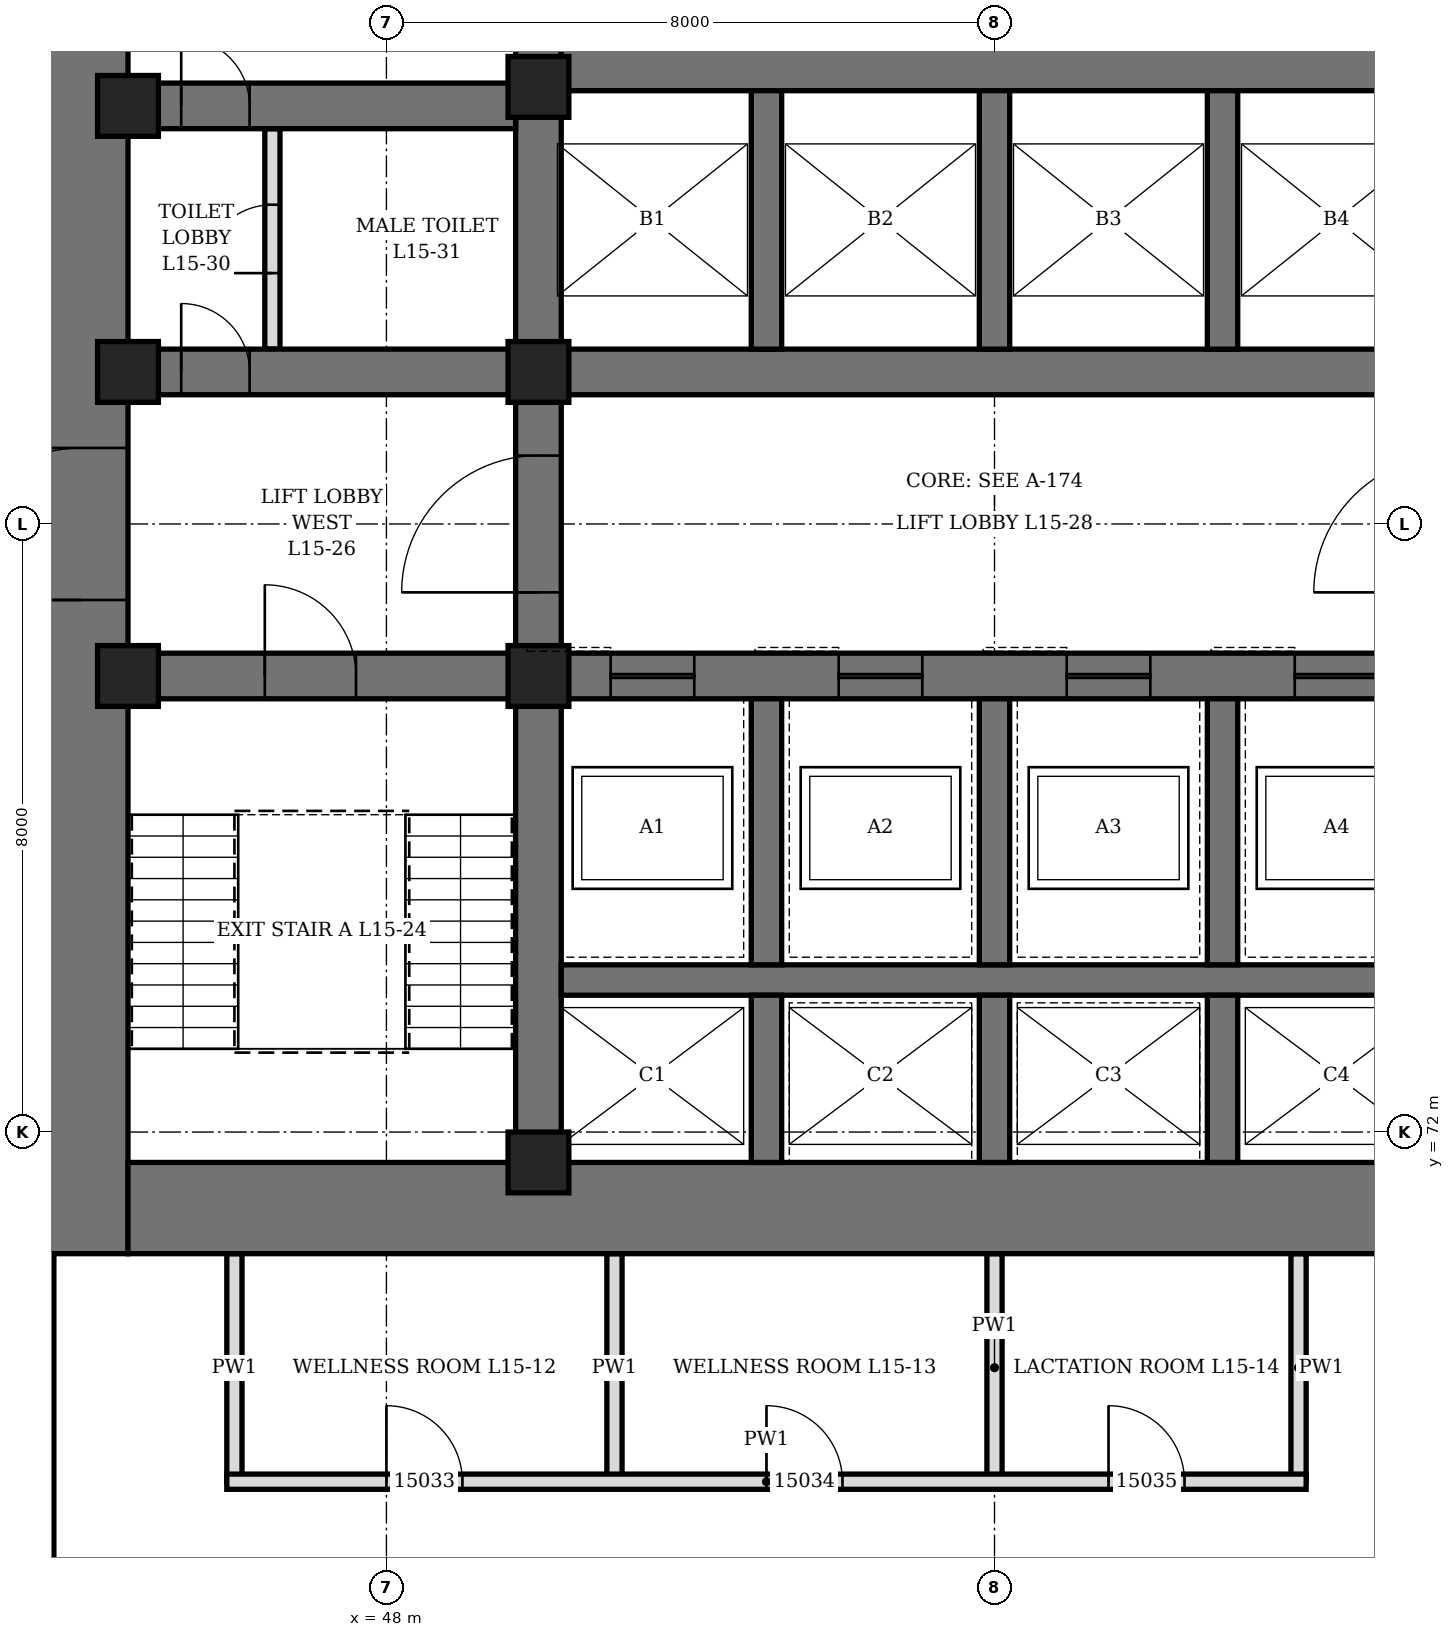
"""IFC4 building model, lengths in metres.
Left out: names, types, materials, properties, quantities, classifications, styles, units other than length and angle.
Written with IfcOpenShell. Run it as: python <this file> out.ifc"""

import sys

from ifc_helpers import new_model, si_unit, direction, frame, frame_2d, origin, origin_2d, place, context, subcontext, project, spatial, rectangle, hollow_rectangle, extrude, element, fill, save


model = new_model("IFC4")
c1 = context("Model", 3, precision=1e-05, world=origin(), true_north=direction((0.0, 1.0)))
c2 = subcontext(c1, "Body", "Model", "MODEL_VIEW")
j1 = project(units=[si_unit("LENGTHUNIT", "METRE"), si_unit("PLANEANGLEUNIT", "RADIAN")], contexts=[c1])
p1 = place(None, origin())
s1 = spatial("IfcSite", under=j1, at=p1, CompositionType="ELEMENT")
p2 = place(p1, origin())
s2 = spatial("IfcBuilding", under=s1, at=p2, CompositionType="ELEMENT")
p3 = place(p2, frame((0.0, 0.0, 72.7)))
s3 = spatial("IfcBuildingStorey", under=s2, at=p3, CompositionType="ELEMENT", Elevation=72.7)
p4 = place(p3, frame((44.0, 70.4, 0.0), z_axis=(0.0, 0.0, 1.0), x_axis=(0.0, 1.0, 0.0)))
e1 = element("IfcWall", 1, at=p4, inside=s3, PredefinedType="SHEAR", context=c2, shape_type="SweptSolid", body=[
    extrude(rectangle(XDim=19.2, YDim=1.2, at=frame_2d((9.6, 0.0))), origin(), (0.0, 0.0, 1.0), 4.2),
])
p5 = place(p4, frame((8.6, 0.0, 0.0)))
e2 = element("IfcOpeningElement", 2, at=p5, cuts=e1, PredefinedType="OPENING", context=c2, shape_type="SweptSolid", body=[
    extrude(rectangle(XDim=2.0, YDim=2.4, at=frame_2d((1.0, 1.2))), frame((0.0, 0.61, 0.0), z_axis=(0.0, -1.0, 0.0), x_axis=(1.0, 0.0, 0.0)), (0.0, 0.0, 1.0), 1.22),
])
p6 = place(p3, frame((44.6, 71.0, 0.0), z_axis=(0.0, 0.0, 1.0), x_axis=(1.0, 0.0, 0.0)))
e3 = element("IfcWall", 3, at=p6, inside=s3, PredefinedType="SHEAR", context=c2, shape_type="SweptSolid", body=[
    extrude(rectangle(XDim=22.8, YDim=1.2, at=frame_2d((11.4, 0.0))), origin(), (0.0, 0.0, 1.0), 4.2),
])
p7 = place(p3, frame((50.0, 71.6, 0.0), z_axis=(0.0, 0.0, 1.0), x_axis=(0.0, 1.0, 0.0)))
e4 = element("IfcWall", 4, at=p7, inside=s3, PredefinedType="SHEAR", context=c2, shape_type="SweptSolid", body=[
    extrude(rectangle(XDim=16.8, YDim=0.6, at=frame_2d((8.4, 0.0))), origin(), (0.0, 0.0, 1.0), 4.2),
])
p8 = place(p7, frame((7.5, 0.0, 0.0)))
e5 = element("IfcOpeningElement", 5, at=p8, cuts=e4, PredefinedType="OPENING", context=c2, shape_type="SweptSolid", body=[
    extrude(rectangle(XDim=1.8, YDim=2.4, at=frame_2d((0.9, 1.2))), frame((0.0, 0.31, 0.0), z_axis=(0.0, -1.0, 0.0), x_axis=(1.0, 0.0, 0.0)), (0.0, 0.0, 1.0), 0.62),
])
p9 = place(p3, frame((44.6, 78.0, 0.0), z_axis=(0.0, 0.0, 1.0), x_axis=(1.0, 0.0, 0.0)))
e6 = element("IfcWall", 6, at=p9, inside=s3, PredefinedType="SHEAR", context=c2, shape_type="SweptSolid", body=[
    extrude(rectangle(XDim=5.1, YDim=0.6, at=frame_2d((2.55, 0.0))), origin(), (0.0, 0.0, 1.0), 4.2),
])
p10 = place(p9, frame((1.8, 0.0, 0.0)))
e7 = element("IfcOpeningElement", 7, at=p10, cuts=e6, PredefinedType="OPENING", context=c2, shape_type="SweptSolid", body=[
    extrude(rectangle(XDim=1.2, YDim=2.1, at=frame_2d((0.6, 1.05))), frame((0.0, 0.31, 0.0), z_axis=(0.0, -1.0, 0.0), x_axis=(1.0, 0.0, 0.0)), (0.0, 0.0, 1.0), 0.62),
])
p11 = place(p3, frame((44.6, 82.0, 0.0), z_axis=(0.0, 0.0, 1.0), x_axis=(1.0, 0.0, 0.0)))
e8 = element("IfcWall", 8, at=p11, inside=s3, PredefinedType="SHEAR", context=c2, shape_type="SweptSolid", body=[
    extrude(rectangle(XDim=5.1, YDim=0.6, at=frame_2d((2.55, 0.0))), origin(), (0.0, 0.0, 1.0), 4.2),
])
p12 = place(p11, frame((0.7, 0.0, 0.0)))
e9 = element("IfcOpeningElement", 9, at=p12, cuts=e8, PredefinedType="OPENING", context=c2, shape_type="SweptSolid", body=[
    extrude(rectangle(XDim=0.9, YDim=2.1, at=frame_2d((0.45, 1.05))), frame((0.0, 0.31, 0.0), z_axis=(0.0, -1.0, 0.0), x_axis=(1.0, 0.0, 0.0)), (0.0, 0.0, 1.0), 0.62),
])
p13 = place(p3, frame((44.6, 85.5, 0.0), z_axis=(0.0, 0.0, 1.0), x_axis=(1.0, 0.0, 0.0)))
e10 = element("IfcWall", 10, at=p13, inside=s3, PredefinedType="SHEAR", context=c2, shape_type="SweptSolid", body=[
    extrude(rectangle(XDim=5.1, YDim=0.6, at=frame_2d((2.55, 0.0))), origin(), (0.0, 0.0, 1.0), 4.2),
])
p14 = place(p13, frame((0.7, 0.0, 0.0)))
e11 = element("IfcOpeningElement", 11, at=p14, cuts=e10, PredefinedType="OPENING", context=c2, shape_type="SweptSolid", body=[
    extrude(rectangle(XDim=0.9, YDim=2.1, at=frame_2d((0.45, 1.05))), frame((0.0, 0.31, 0.0), z_axis=(0.0, -1.0, 0.0), x_axis=(1.0, 0.0, 0.0)), (0.0, 0.0, 1.0), 0.62),
])
p15 = place(p3, frame((50.3, 78.0, 0.0), z_axis=(0.0, 0.0, 1.0), x_axis=(1.0, 0.0, 0.0)))
e12 = element("IfcWall", 12, at=p15, inside=s3, PredefinedType="SHEAR", context=c2, shape_type="SweptSolid", body=[
    extrude(rectangle(XDim=11.4, YDim=0.6, at=frame_2d((5.7, 0.0))), origin(), (0.0, 0.0, 1.0), 4.2),
])
p16 = place(p15, frame((0.65, 0.0, 0.0)))
e13 = element("IfcOpeningElement", 13, at=p16, cuts=e12, PredefinedType="OPENING", context=c2, shape_type="SweptSolid", body=[
    extrude(rectangle(XDim=1.1, YDim=2.2, at=frame_2d((0.55, 1.1))), frame((0.0, 0.31, 0.0), z_axis=(0.0, -1.0, 0.0), x_axis=(1.0, 0.0, 0.0)), (0.0, 0.0, 1.0), 0.62),
])
p17 = place(p15, frame((3.65, 0.0, 0.0)))
e14 = element("IfcOpeningElement", 14, at=p17, cuts=e12, PredefinedType="OPENING", context=c2, shape_type="SweptSolid", body=[
    extrude(rectangle(XDim=1.1, YDim=2.2, at=frame_2d((0.55, 1.1))), frame((0.0, 0.31, 0.0), z_axis=(0.0, -1.0, 0.0), x_axis=(1.0, 0.0, 0.0)), (0.0, 0.0, 1.0), 0.62),
])
p18 = place(p15, frame((6.65, 0.0, 0.0)))
e15 = element("IfcOpeningElement", 15, at=p18, cuts=e12, PredefinedType="OPENING", context=c2, shape_type="SweptSolid", body=[
    extrude(rectangle(XDim=1.1, YDim=2.2, at=frame_2d((0.55, 1.1))), frame((0.0, 0.31, 0.0), z_axis=(0.0, -1.0, 0.0), x_axis=(1.0, 0.0, 0.0)), (0.0, 0.0, 1.0), 0.62),
])
p19 = place(p15, frame((9.65, 0.0, 0.0)))
e16 = element("IfcOpeningElement", 16, at=p19, cuts=e12, PredefinedType="OPENING", context=c2, shape_type="SweptSolid", body=[
    extrude(rectangle(XDim=1.1, YDim=2.2, at=frame_2d((0.55, 1.1))), frame((0.0, 0.31, 0.0), z_axis=(0.0, -1.0, 0.0), x_axis=(1.0, 0.0, 0.0)), (0.0, 0.0, 1.0), 0.62),
])
for number, where, z_axis, x_axis in (
    (17, (50.3, 82.0, 0.0), (0.0, 0.0, 1.0), (1.0, 0.0, 0.0)),
    (18, (50.3, 86.0, 0.0), (0.0, 0.0, 1.0), (1.0, 0.0, 0.0)),
):
    element("IfcWall", number, at=place(p3, frame(where, z_axis=z_axis, x_axis=x_axis)), inside=s3, PredefinedType="SHEAR", context=c2, shape_type="SweptSolid", body=[
        extrude(rectangle(XDim=11.4, YDim=0.6, at=frame_2d((5.7, 0.0))), origin(), (0.0, 0.0, 1.0), 4.2),
    ])
p20 = place(p3, frame((50.3, 74.0, 0.0), z_axis=(0.0, 0.0, 1.0), x_axis=(1.0, 0.0, 0.0)))
e19 = element("IfcWall", 19, at=p20, inside=s3, PredefinedType="SHEAR", context=c2, shape_type="SweptSolid", body=[
    extrude(rectangle(XDim=11.4, YDim=0.4, at=frame_2d((5.7, 0.0))), origin(), (0.0, 0.0, 1.0), 4.2),
])
p21 = place(p3, frame((53.0, 71.6, 0.0), z_axis=(0.0, 0.0, 1.0), x_axis=(0.0, 1.0, 0.0)))
e20 = element("IfcWall", 20, at=p21, inside=s3, PredefinedType="SHEAR", context=c2, shape_type="SweptSolid", body=[
    extrude(rectangle(XDim=2.2, YDim=0.4, at=frame_2d((1.1, 0.0))), origin(), (0.0, 0.0, 1.0), 4.2),
])
p22 = place(p3, frame((53.0, 74.2, 0.0), z_axis=(0.0, 0.0, 1.0), x_axis=(0.0, 1.0, 0.0)))
e21 = element("IfcWall", 21, at=p22, inside=s3, PredefinedType="SHEAR", context=c2, shape_type="SweptSolid", body=[
    extrude(rectangle(XDim=3.5, YDim=0.4, at=frame_2d((1.75, 0.0))), origin(), (0.0, 0.0, 1.0), 4.2),
])
p23 = place(p3, frame((53.0, 82.3, 0.0), z_axis=(0.0, 0.0, 1.0), x_axis=(0.0, 1.0, 0.0)))
e22 = element("IfcWall", 22, at=p23, inside=s3, PredefinedType="SHEAR", context=c2, shape_type="SweptSolid", body=[
    extrude(rectangle(XDim=3.4, YDim=0.4, at=frame_2d((1.7, 0.0))), origin(), (0.0, 0.0, 1.0), 4.2),
])
p24 = place(p3, frame((56.0, 71.6, 0.0), z_axis=(0.0, 0.0, 1.0), x_axis=(0.0, 1.0, 0.0)))
e23 = element("IfcWall", 23, at=p24, inside=s3, PredefinedType="SHEAR", context=c2, shape_type="SweptSolid", body=[
    extrude(rectangle(XDim=2.2, YDim=0.4, at=frame_2d((1.1, 0.0))), origin(), (0.0, 0.0, 1.0), 4.2),
])
p25 = place(p3, frame((56.0, 74.2, 0.0), z_axis=(0.0, 0.0, 1.0), x_axis=(0.0, 1.0, 0.0)))
e24 = element("IfcWall", 24, at=p25, inside=s3, PredefinedType="SHEAR", context=c2, shape_type="SweptSolid", body=[
    extrude(rectangle(XDim=3.5, YDim=0.4, at=frame_2d((1.75, 0.0))), origin(), (0.0, 0.0, 1.0), 4.2),
])
p26 = place(p3, frame((56.0, 82.3, 0.0), z_axis=(0.0, 0.0, 1.0), x_axis=(0.0, 1.0, 0.0)))
e25 = element("IfcWall", 25, at=p26, inside=s3, PredefinedType="SHEAR", context=c2, shape_type="SweptSolid", body=[
    extrude(rectangle(XDim=3.4, YDim=0.4, at=frame_2d((1.7, 0.0))), origin(), (0.0, 0.0, 1.0), 4.2),
])
p27 = place(p3, frame((59.0, 71.6, 0.0), z_axis=(0.0, 0.0, 1.0), x_axis=(0.0, 1.0, 0.0)))
e26 = element("IfcWall", 26, at=p27, inside=s3, PredefinedType="SHEAR", context=c2, shape_type="SweptSolid", body=[
    extrude(rectangle(XDim=2.2, YDim=0.4, at=frame_2d((1.1, 0.0))), origin(), (0.0, 0.0, 1.0), 4.2),
])
p28 = place(p3, frame((59.0, 74.2, 0.0), z_axis=(0.0, 0.0, 1.0), x_axis=(0.0, 1.0, 0.0)))
e27 = element("IfcWall", 27, at=p28, inside=s3, PredefinedType="SHEAR", context=c2, shape_type="SweptSolid", body=[
    extrude(rectangle(XDim=3.5, YDim=0.4, at=frame_2d((1.75, 0.0))), origin(), (0.0, 0.0, 1.0), 4.2),
])
p29 = place(p3, frame((59.0, 82.3, 0.0), z_axis=(0.0, 0.0, 1.0), x_axis=(0.0, 1.0, 0.0)))
e28 = element("IfcWall", 28, at=p29, inside=s3, PredefinedType="SHEAR", context=c2, shape_type="SweptSolid", body=[
    extrude(rectangle(XDim=3.4, YDim=0.4, at=frame_2d((1.7, 0.0))), origin(), (0.0, 0.0, 1.0), 4.2),
])
for number, where, z_axis, x_axis in (
    (29, (44.6, 78.0, 0.0), (0.0, 0.0, 1.0), (1.0, 0.0, 0.0)),
    (30, (44.6, 82.0, 0.0), (0.0, 0.0, 1.0), (1.0, 0.0, 0.0)),
    (31, (44.6, 85.5, 0.0), (0.0, 0.0, 1.0), (1.0, 0.0, 0.0)),
    (32, (50.0, 71.6, 0.0), (0.0, 0.0, 1.0), (1.0, 0.0, 0.0)),
    (33, (50.0, 78.0, 0.0), (0.0, 0.0, 1.0), (1.0, 0.0, 0.0)),
    (34, (50.0, 82.0, 0.0), (0.0, 0.0, 1.0), (1.0, 0.0, 0.0)),
    (35, (50.0, 85.75, 0.0), (0.0, 0.0, 1.0), (1.0, 0.0, 0.0)),
):
    element("IfcColumn", number, at=place(p3, frame(where, z_axis=z_axis, x_axis=x_axis)), inside=s3, PredefinedType="COLUMN", context=c2, shape_type="SweptSolid", body=[
        extrude(hollow_rectangle(XDim=0.8, YDim=0.8, WallThickness=0.1, at=origin_2d()), origin(), (0.0, 0.0, 1.0), 4.2),
    ])
p30 = place(p3, frame((46.5, 82.3, 0.0), z_axis=(0.0, 0.0, 1.0), x_axis=(0.0, 1.0, 0.0)))
e36 = element("IfcWall", 36, at=p30, inside=s3, PredefinedType="PARTITIONING", context=c2, shape_type="SweptSolid", body=[
    extrude(rectangle(XDim=2.9, YDim=0.2, at=frame_2d((1.45, 0.0))), origin(), (0.0, 0.0, 1.0), 4.04),
])
p31 = place(p30, frame((1.0, 0.0, 0.0)))
e37 = element("IfcOpeningElement", 37, at=p31, cuts=e36, PredefinedType="OPENING", context=c2, shape_type="SweptSolid", body=[
    extrude(rectangle(XDim=0.9, YDim=2.1, at=frame_2d((0.45, 1.05))), frame((0.0, 0.11, 0.0), z_axis=(0.0, -1.0, 0.0), x_axis=(1.0, 0.0, 0.0)), (0.0, 0.0, 1.0), 0.22),
])
for number, where, z_axis, x_axis in (
    (38, (46.0, 67.4, 0.0), (0.0, 0.0, 1.0), (0.0, 1.0, 0.0)),
    (39, (51.0, 67.4, 0.0), (0.0, 0.0, 1.0), (0.0, 1.0, 0.0)),
    (40, (56.0, 67.4, 0.0), (0.0, 0.0, 1.0), (0.0, 1.0, 0.0)),
    (41, (60.0, 67.4, 0.0), (0.0, 0.0, 1.0), (0.0, 1.0, 0.0)),
):
    element("IfcWall", number, at=place(p3, frame(where, z_axis=z_axis, x_axis=x_axis)), inside=s3, PredefinedType="PARTITIONING", context=c2, shape_type="SweptSolid", body=[
        extrude(rectangle(XDim=3.0, YDim=0.2, at=frame_2d((1.5, 0.0))), origin(), (0.0, 0.0, 1.0), 4.04),
    ])
p32 = place(p3, frame((45.9, 67.4, 0.0), z_axis=(0.0, 0.0, 1.0), x_axis=(1.0, 0.0, 0.0)))
e42 = element("IfcWall", 42, at=p32, inside=s3, PredefinedType="PARTITIONING", context=c2, shape_type="SweptSolid", body=[
    extrude(rectangle(XDim=14.2, YDim=0.2, at=frame_2d((7.1, 0.0))), origin(), (0.0, 0.0, 1.0), 4.04),
])
p33 = place(p32, frame((2.1, 0.0, 0.0)))
e43 = element("IfcOpeningElement", 43, at=p33, cuts=e42, PredefinedType="OPENING", context=c2, shape_type="SweptSolid", body=[
    extrude(rectangle(XDim=1.0, YDim=2.1, at=frame_2d((0.5, 1.05))), frame((0.0, 0.11, 0.0), z_axis=(0.0, -1.0, 0.0), x_axis=(1.0, 0.0, 0.0)), (0.0, 0.0, 1.0), 0.22),
])
p34 = place(p32, frame((7.1, 0.0, 0.0)))
e44 = element("IfcOpeningElement", 44, at=p34, cuts=e42, PredefinedType="OPENING", context=c2, shape_type="SweptSolid", body=[
    extrude(rectangle(XDim=1.0, YDim=2.1, at=frame_2d((0.5, 1.05))), frame((0.0, 0.11, 0.0), z_axis=(0.0, -1.0, 0.0), x_axis=(1.0, 0.0, 0.0)), (0.0, 0.0, 1.0), 0.22),
])
p35 = place(p32, frame((11.6, 0.0, 0.0)))
e45 = element("IfcOpeningElement", 45, at=p35, cuts=e42, PredefinedType="OPENING", context=c2, shape_type="SweptSolid", body=[
    extrude(rectangle(XDim=1.0, YDim=2.1, at=frame_2d((0.5, 1.05))), frame((0.0, 0.11, 0.0), z_axis=(0.0, -1.0, 0.0), x_axis=(1.0, 0.0, 0.0)), (0.0, 0.0, 1.0), 0.22),
])
p36 = place(p3, frame((43.55, 55.31, 0.0), z_axis=(0.0, 0.0, 1.0), x_axis=(0.0, 1.0, 0.0)))
e46 = element("IfcWall", 46, at=p36, inside=s3, PredefinedType="PARTITIONING", context=c2, shape_type="SweptSolid", body=[
    extrude(rectangle(XDim=15.09, YDim=0.15, at=frame_2d((7.545, 0.0))), origin(), (0.0, 0.0, 1.0), 4.04),
])
p37 = place(p36, frame((7.045, 0.0, 0.0)))
e47 = element("IfcOpeningElement", 47, at=p37, cuts=e46, PredefinedType="OPENING", context=c2, shape_type="SweptSolid", body=[
    extrude(rectangle(XDim=1.0, YDim=2.4, at=frame_2d((0.5, 1.2))), frame((0.0, 0.085, 0.0), z_axis=(0.0, -1.0, 0.0), x_axis=(1.0, 0.0, 0.0)), (0.0, 0.0, 1.0), 0.17),
])
p38 = place(p12, origin())
e48 = element("IfcDoor", 48, at=p38, inside=s3, OperationType="SINGLE_SWING_LEFT", PredefinedType="DOOR", context=c2, shape_type="SweptSolid", body=[
    extrude(rectangle(XDim=0.9, YDim=2.1, at=frame_2d((0.45, 1.05))), frame((0.0, 0.3, 0.0), z_axis=(0.0, -1.0, 0.0), x_axis=(1.0, 0.0, 0.0)), (0.0, 0.0, 1.0), 0.6),
])
fill(e9, e48)
p39 = place(p31, origin())
e49 = element("IfcDoor", 49, at=p39, inside=s3, OperationType="SINGLE_SWING_RIGHT", PredefinedType="DOOR", context=c2, shape_type="SweptSolid", body=[
    extrude(rectangle(XDim=0.9, YDim=2.1, at=frame_2d((0.45, 1.05))), frame((0.0, 0.1, 0.0), z_axis=(0.0, -1.0, 0.0), x_axis=(1.0, 0.0, 0.0)), (0.0, 0.0, 1.0), 0.199),
])
fill(e37, e49)
p40 = place(p14, origin())
e50 = element("IfcDoor", 50, at=p40, inside=s3, OperationType="SINGLE_SWING_RIGHT", PredefinedType="DOOR", context=c2, shape_type="SweptSolid", body=[
    extrude(rectangle(XDim=0.9, YDim=2.1, at=frame_2d((0.45, 1.05))), frame((0.0, 0.3, 0.0), z_axis=(0.0, -1.0, 0.0), x_axis=(1.0, 0.0, 0.0)), (0.0, 0.0, 1.0), 0.6),
])
fill(e11, e50)
p41 = place(p10, origin())
e51 = element("IfcDoor", 51, at=p41, inside=s3, OperationType="SINGLE_SWING_LEFT", PredefinedType="DOOR", context=c2, shape_type="SweptSolid", body=[
    extrude(rectangle(XDim=1.2, YDim=2.1, at=frame_2d((0.6, 1.05))), frame((0.0, 0.3, 0.0), z_axis=(0.0, -1.0, 0.0), x_axis=(1.0, 0.0, 0.0)), (0.0, 0.0, 1.0), 0.6),
])
fill(e7, e51)
p42 = place(p5, origin())
e52 = element("IfcDoor", 52, at=p42, inside=s3, OperationType="DOUBLE_DOOR_SINGLE_SWING", PredefinedType="DOOR", context=c2, shape_type="SweptSolid", body=[
    extrude(rectangle(XDim=2.0, YDim=2.4, at=frame_2d((1.0, 1.2))), frame((0.0, 0.35, 0.0), z_axis=(0.0, -1.0, 0.0), x_axis=(1.0, 0.0, 0.0)), (0.0, 0.0, 1.0), 0.7),
])
fill(e2, e52)
p43 = place(p8, origin())
e53 = element("IfcDoor", 53, at=p43, inside=s3, OperationType="DOUBLE_DOOR_SINGLE_SWING", PredefinedType="DOOR", context=c2, shape_type="SweptSolid", body=[
    extrude(rectangle(XDim=1.8, YDim=2.4, at=frame_2d((0.9, 1.2))), frame((0.0, 0.3, 0.0), z_axis=(0.0, -1.0, 0.0), x_axis=(1.0, 0.0, 0.0)), (0.0, 0.0, 1.0), 0.6),
])
fill(e5, e53)
p44 = place(p16, origin())
e54 = element("IfcDoor", 54, at=p44, inside=s3, OperationType="SLIDING_TO_LEFT", PredefinedType="DOOR", context=c2, shape_type="SweptSolid", body=[
    extrude(rectangle(XDim=1.1, YDim=2.2, at=frame_2d((0.55, 1.1))), frame((0.0, 0.3, 0.0), z_axis=(0.0, -1.0, 0.0), x_axis=(1.0, 0.0, 0.0)), (0.0, 0.0, 1.0), 0.6),
])
fill(e13, e54)
p45 = place(p17, origin())
e55 = element("IfcDoor", 55, at=p45, inside=s3, OperationType="SLIDING_TO_LEFT", PredefinedType="DOOR", context=c2, shape_type="SweptSolid", body=[
    extrude(rectangle(XDim=1.1, YDim=2.2, at=frame_2d((0.55, 1.1))), frame((0.0, 0.3, 0.0), z_axis=(0.0, -1.0, 0.0), x_axis=(1.0, 0.0, 0.0)), (0.0, 0.0, 1.0), 0.6),
])
fill(e14, e55)
p46 = place(p18, origin())
e56 = element("IfcDoor", 56, at=p46, inside=s3, OperationType="SLIDING_TO_LEFT", PredefinedType="DOOR", context=c2, shape_type="SweptSolid", body=[
    extrude(rectangle(XDim=1.1, YDim=2.2, at=frame_2d((0.55, 1.1))), frame((0.0, 0.3, 0.0), z_axis=(0.0, -1.0, 0.0), x_axis=(1.0, 0.0, 0.0)), (0.0, 0.0, 1.0), 0.6),
])
fill(e15, e56)
p47 = place(p19, origin())
e57 = element("IfcDoor", 57, at=p47, inside=s3, OperationType="SLIDING_TO_LEFT", PredefinedType="DOOR", context=c2, shape_type="SweptSolid", body=[
    extrude(rectangle(XDim=1.1, YDim=2.2, at=frame_2d((0.55, 1.1))), frame((0.0, 0.3, 0.0), z_axis=(0.0, -1.0, 0.0), x_axis=(1.0, 0.0, 0.0)), (0.0, 0.0, 1.0), 0.6),
])
fill(e16, e57)
p48 = place(p33, origin())
e58 = element("IfcDoor", 58, at=p48, inside=s3, OperationType="SINGLE_SWING_LEFT", PredefinedType="DOOR", context=c2, shape_type="SweptSolid", body=[
    extrude(rectangle(XDim=1.0, YDim=2.1, at=frame_2d((0.5, 1.05))), frame((0.0, 0.1, 0.0), z_axis=(0.0, -1.0, 0.0), x_axis=(1.0, 0.0, 0.0)), (0.0, 0.0, 1.0), 0.199),
])
fill(e43, e58)
p49 = place(p34, origin())
e59 = element("IfcDoor", 59, at=p49, inside=s3, OperationType="SINGLE_SWING_LEFT", PredefinedType="DOOR", context=c2, shape_type="SweptSolid", body=[
    extrude(rectangle(XDim=1.0, YDim=2.1, at=frame_2d((0.5, 1.05))), frame((0.0, 0.1, 0.0), z_axis=(0.0, -1.0, 0.0), x_axis=(1.0, 0.0, 0.0)), (0.0, 0.0, 1.0), 0.199),
])
fill(e44, e59)
p50 = place(p35, origin())
e60 = element("IfcDoor", 60, at=p50, inside=s3, OperationType="SINGLE_SWING_LEFT", PredefinedType="DOOR", context=c2, shape_type="SweptSolid", body=[
    extrude(rectangle(XDim=1.0, YDim=2.1, at=frame_2d((0.5, 1.05))), frame((0.0, 0.1, 0.0), z_axis=(0.0, -1.0, 0.0), x_axis=(1.0, 0.0, 0.0)), (0.0, 0.0, 1.0), 0.199),
])
fill(e45, e60)
save(model, sys.argv[1])
